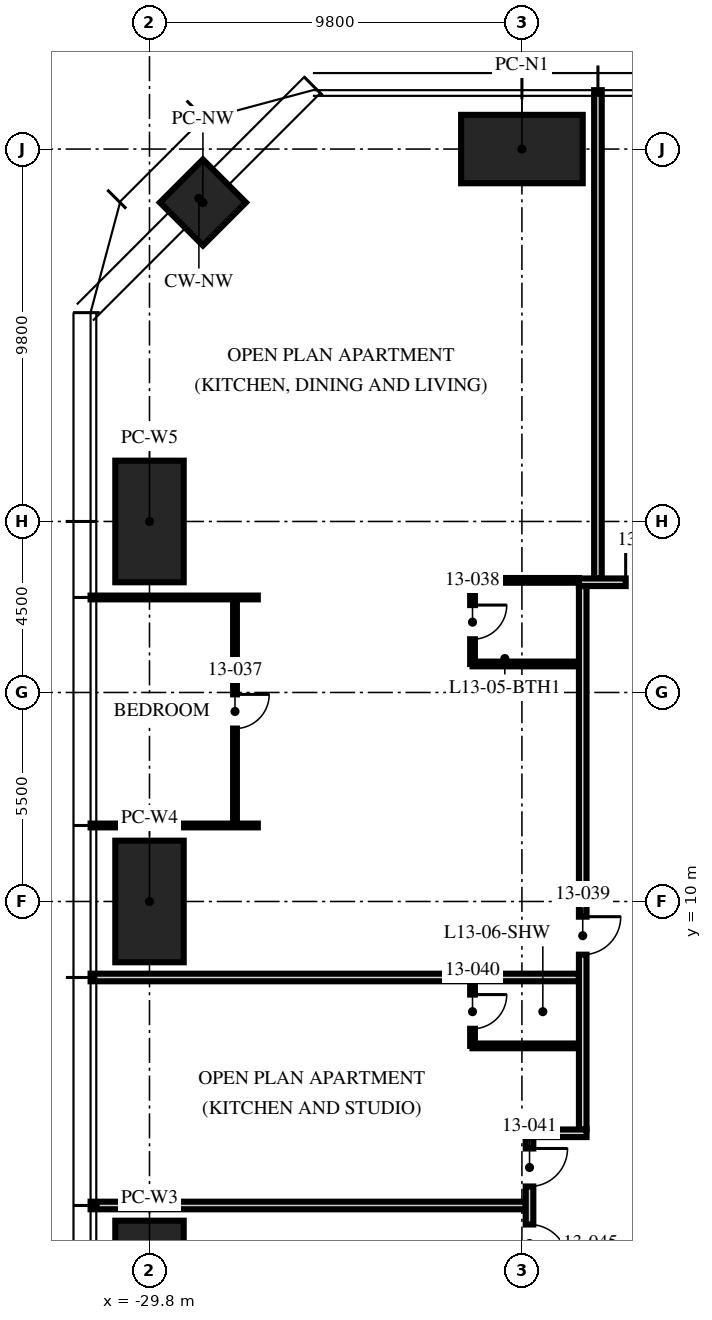
"""IFC4 building model, lengths in metres.
Left out: names, types, materials, properties, quantities, classifications, styles, units other than length and angle.
Written with IfcOpenShell. Run it as: python <this file> out.ifc"""

import sys

from ifc_helpers import new_model, si_unit, direction, frame, frame_2d, origin, origin_2d, place, context, subcontext, project, spatial, rectangle, hollow_rectangle, extrude, element, fill, save


model = new_model("IFC4")
c1 = context("Model", 3, precision=1e-05, world=origin(), true_north=direction((0.0, 1.0)))
c2 = subcontext(c1, "Body", "Model", "MODEL_VIEW")
j1 = project(units=[si_unit("LENGTHUNIT", "METRE"), si_unit("PLANEANGLEUNIT", "RADIAN")], contexts=[c1])
p1 = place(None, origin())
s1 = spatial("IfcSite", under=j1, at=p1, CompositionType="ELEMENT")
p2 = place(p1, origin())
s2 = spatial("IfcBuilding", under=s1, at=p2, CompositionType="ELEMENT")
p3 = place(p2, frame((0.0, 0.0, 54.75)))
s3 = spatial("IfcBuildingStorey", under=s2, at=p3, CompositionType="ELEMENT", Elevation=54.75)
for number, where, z_axis, x_axis in (
    (1, (-20.0, 29.8, 0.0), (0.0, 0.0, 1.0), (1.0, 0.0, 0.0)),
    (2, (-29.8, 0.0, 0.0), (0.0, 0.0, 1.0), (0.0, 1.0, 0.0)),
    (3, (-29.8, 10.0, 0.0), (0.0, 0.0, 1.0), (0.0, 1.0, 0.0)),
    (4, (-29.8, 20.0, 0.0), (0.0, 0.0, 1.0), (0.0, 1.0, 0.0)),
):
    element("IfcColumn", number, at=place(p3, frame(where, z_axis=z_axis, x_axis=x_axis)), inside=s3, PredefinedType="COLUMN", context=c2, shape_type="SweptSolid", body=[
        extrude(hollow_rectangle(XDim=3.2, YDim=1.8, WallThickness=0.2, at=origin_2d()), origin(), (0.0, 0.0, 1.0), 3.75),
    ])
p4 = place(p3, frame((-28.394, 28.394, 0.0), z_axis=(0.0, 0.0, 1.0), x_axis=(0.707106781187, 0.707106781187, 0.0)))
e5 = element("IfcColumn", 5, at=p4, inside=s3, PredefinedType="COLUMN", context=c2, shape_type="SweptSolid", body=[
    extrude(hollow_rectangle(XDim=1.6, YDim=1.6, WallThickness=0.1, at=origin_2d()), origin(), (0.0, 0.0, 1.0), 3.75),
])
p5 = place(p3, frame((-18.0, 18.5, 0.0), z_axis=(0.0, 0.0, 1.0), x_axis=(0.0, 1.0, 0.0)))
e6 = element("IfcWall", 6, at=p5, inside=s3, PredefinedType="PARTITIONING", context=c2, shape_type="SweptSolid", body=[
    extrude(rectangle(XDim=12.85, YDim=0.2, at=frame_2d((6.425, 0.0))), origin(), (0.0, 0.0, 1.0), 2.3),
])
for number, where, z_axis, x_axis in (
    (7, (-26.95, 18.0, 0.0), (0.0, 0.0, 1.0), (-1.0, 0.0, 0.0)),
    (8, (-26.95, 12.0, 0.0), (0.0, 0.0, 1.0), (-1.0, 0.0, 0.0)),
):
    element("IfcWall", number, at=place(p3, frame(where, z_axis=z_axis, x_axis=x_axis)), inside=s3, PredefinedType="PARTITIONING", context=c2, shape_type="SweptSolid", body=[
        extrude(rectangle(XDim=4.4, YDim=0.1, at=frame_2d((2.2, 0.0))), origin(), (0.0, 0.0, 1.0), 2.71),
    ])
p6 = place(p3, frame((-18.5, 8.0, 0.0), z_axis=(0.0, 0.0, 1.0), x_axis=(-1.0, 0.0, 0.0)))
e9 = element("IfcWall", 9, at=p6, inside=s3, PredefinedType="PARTITIONING", context=c2, shape_type="SweptSolid", body=[
    extrude(rectangle(XDim=12.85, YDim=0.2, at=frame_2d((6.425, 0.0))), origin(), (0.0, 0.0, 1.0), 2.71),
])
p7 = place(p3, frame((-19.9, 2.0, 0.0), z_axis=(0.0, 0.0, 1.0), x_axis=(-1.0, 0.0, 0.0)))
e10 = element("IfcWall", 10, at=p7, inside=s3, PredefinedType="PARTITIONING", context=c2, shape_type="SweptSolid", body=[
    extrude(rectangle(XDim=11.45, YDim=0.2, at=frame_2d((5.725, 0.0))), origin(), (0.0, 0.0, 1.0), 2.71),
])
p8 = place(p3, frame((-27.55, 18.0, 0.0), z_axis=(0.0, 0.0, 1.0), x_axis=(0.0, -1.0, 0.0)))
e11 = element("IfcWall", 11, at=p8, inside=s3, PredefinedType="PARTITIONING", context=c2, shape_type="SweptSolid", body=[
    extrude(rectangle(XDim=6.0, YDim=0.1, at=frame_2d((3.0, 0.0))), origin(), (0.0, 0.0, 1.0), 2.61),
])
p9 = place(p8, frame((2.55, 0.0, 0.0)))
e12 = element("IfcOpeningElement", 12, at=p9, cuts=e11, PredefinedType="OPENING", context=c2, shape_type="SweptSolid", body=[
    extrude(rectangle(XDim=0.9, YDim=2.1, at=frame_2d((0.45, 1.05))), frame((0.0, 0.06, 0.0), z_axis=(0.0, -1.0, 0.0), x_axis=(1.0, 0.0, 0.0)), (0.0, 0.0, 1.0), 0.12),
])
p10 = place(p3, frame((-21.3, 18.45, 0.0), z_axis=(0.0, 0.0, 1.0), x_axis=(0.0, -1.0, 0.0)))
e13 = element("IfcWall", 13, at=p10, inside=s3, PredefinedType="PARTITIONING", context=c2, shape_type="SweptSolid", body=[
    extrude(rectangle(XDim=2.2, YDim=0.125, at=frame_2d((1.1, 0.0))), origin(), (0.0, 0.0, 1.0), 3.5),
])
p11 = place(p10, frame((0.65, 0.0, 0.0)))
e14 = element("IfcOpeningElement", 14, at=p11, cuts=e13, PredefinedType="OPENING", context=c2, shape_type="SweptSolid", body=[
    extrude(rectangle(XDim=0.9, YDim=2.1, at=frame_2d((0.45, 1.05))), frame((0.0, 0.073, 0.0), z_axis=(0.0, -1.0, 0.0), x_axis=(1.0, 0.0, 0.0)), (0.0, 0.0, 1.0), 0.145),
])
p12 = place(p3, frame((-18.5, 18.45, 0.0), z_axis=(0.0, 0.0, 1.0), x_axis=(-1.0, 0.0, 0.0)))
e15 = element("IfcWall", 15, at=p12, inside=s3, PredefinedType="PARTITIONING", context=c2, shape_type="SweptSolid", body=[
    extrude(rectangle(XDim=2.8, YDim=0.125, at=frame_2d((1.4, 0.0))), origin(), (0.0, 0.0, 1.0), 2.3),
])
p13 = place(p3, frame((-18.5, 16.25, 0.0), z_axis=(0.0, 0.0, 1.0), x_axis=(-1.0, 0.0, 0.0)))
e16 = element("IfcWall", 16, at=p13, inside=s3, PredefinedType="PARTITIONING", context=c2, shape_type="SweptSolid", body=[
    extrude(rectangle(XDim=2.8, YDim=0.125, at=frame_2d((1.4, 0.0))), origin(), (0.0, 0.0, 1.0), 3.5),
])
p14 = place(p3, frame((-21.3, 8.0, 0.0), z_axis=(0.0, 0.0, 1.0), x_axis=(0.0, -1.0, 0.0)))
e17 = element("IfcWall", 17, at=p14, inside=s3, PredefinedType="PARTITIONING", context=c2, shape_type="SweptSolid", body=[
    extrude(rectangle(XDim=1.8, YDim=0.125, at=frame_2d((0.9, 0.0))), origin(), (0.0, 0.0, 1.0), 3.5),
])
p15 = place(p14, frame((0.45, 0.0, 0.0)))
e18 = element("IfcOpeningElement", 18, at=p15, cuts=e17, PredefinedType="OPENING", context=c2, shape_type="SweptSolid", body=[
    extrude(rectangle(XDim=0.9, YDim=2.1, at=frame_2d((0.45, 1.05))), frame((0.0, 0.073, 0.0), z_axis=(0.0, -1.0, 0.0), x_axis=(1.0, 0.0, 0.0)), (0.0, 0.0, 1.0), 0.145),
])
p16 = place(p3, frame((-18.5, 6.2, 0.0), z_axis=(0.0, 0.0, 1.0), x_axis=(-1.0, 0.0, 0.0)))
e19 = element("IfcWall", 19, at=p16, inside=s3, PredefinedType="PARTITIONING", context=c2, shape_type="SweptSolid", body=[
    extrude(rectangle(XDim=2.8, YDim=0.125, at=frame_2d((1.4, 0.0))), origin(), (0.0, 0.0, 1.0), 3.5),
])
p17 = place(p3, frame((-18.5, 18.4, 0.0), z_axis=(0.0, 0.0, 1.0), x_axis=(1.0, 0.0, 0.0)))
e20 = element("IfcWall", 20, at=p17, inside=s3, PredefinedType="PARTITIONING", context=c2, shape_type="SweptSolid", body=[
    extrude(rectangle(XDim=37.0, YDim=0.2, at=frame_2d((18.5, 0.0))), origin(), (0.0, 0.0, 1.0), 2.3),
])
p18 = place(p17, frame((1.23, 0.0, 0.0)))
e21 = element("IfcOpeningElement", 21, at=p18, cuts=e20, PredefinedType="OPENING", context=c2, shape_type="SweptSolid", body=[
    extrude(rectangle(XDim=1.0, YDim=2.2, at=frame_2d((0.5, 1.1))), frame((0.0, 0.11, 0.0), z_axis=(0.0, -1.0, 0.0), x_axis=(1.0, 0.0, 0.0)), (0.0, 0.0, 1.0), 0.22),
])
p19 = place(p3, frame((-18.4, 18.3, 0.0), z_axis=(0.0, 0.0, 1.0), x_axis=(0.0, -1.0, 0.0)))
e22 = element("IfcWall", 22, at=p19, inside=s3, PredefinedType="PARTITIONING", context=c2, shape_type="SweptSolid", body=[
    extrude(rectangle(XDim=14.3, YDim=0.2, at=frame_2d((7.15, 0.0))), origin(), (0.0, 0.0, 1.0), 2.3),
])
p20 = place(p19, frame((8.7, 0.0, 0.0)))
e23 = element("IfcOpeningElement", 23, at=p20, cuts=e22, PredefinedType="OPENING", context=c2, shape_type="SweptSolid", body=[
    extrude(rectangle(XDim=1.0, YDim=2.2, at=frame_2d((0.5, 1.1))), frame((0.0, 0.11, 0.0), z_axis=(0.0, -1.0, 0.0), x_axis=(1.0, 0.0, 0.0)), (0.0, 0.0, 1.0), 0.22),
])
p21 = place(p3, frame((-18.3, 3.9, 0.0), z_axis=(0.0, 0.0, 1.0), x_axis=(-1.0, 0.0, 0.0)))
e24 = element("IfcWall", 24, at=p21, inside=s3, PredefinedType="PARTITIONING", context=c2, shape_type="SweptSolid", body=[
    extrude(rectangle(XDim=1.6, YDim=0.2, at=frame_2d((0.8, 0.0))), origin(), (0.0, 0.0, 1.0), 3.5),
])
p22 = place(p3, frame((-19.8, 3.8, 0.0), z_axis=(0.0, 0.0, 1.0), x_axis=(0.0, -1.0, 0.0)))
e25 = element("IfcWall", 25, at=p22, inside=s3, PredefinedType="PARTITIONING", context=c2, shape_type="SweptSolid", body=[
    extrude(rectangle(XDim=3.6, YDim=0.2, at=frame_2d((1.8, 0.0))), origin(), (0.0, 0.0, 1.0), 3.5),
])
p23 = place(p22, frame((0.3, 0.0, 0.0)))
e26 = element("IfcOpeningElement", 26, at=p23, cuts=e25, PredefinedType="OPENING", context=c2, shape_type="SweptSolid", body=[
    extrude(rectangle(XDim=1.0, YDim=2.2, at=frame_2d((0.5, 1.1))), frame((0.0, 0.11, 0.0), z_axis=(0.0, -1.0, 0.0), x_axis=(1.0, 0.0, 0.0)), (0.0, 0.0, 1.0), 0.22),
])
p24 = place(p22, frame((2.3, 0.0, 0.0)))
e27 = element("IfcOpeningElement", 27, at=p24, cuts=e25, PredefinedType="OPENING", context=c2, shape_type="SweptSolid", body=[
    extrude(rectangle(XDim=1.0, YDim=2.2, at=frame_2d((0.5, 1.1))), frame((0.0, 0.11, 0.0), z_axis=(0.0, -1.0, 0.0), x_axis=(1.0, 0.0, 0.0)), (0.0, 0.0, 1.0), 0.22),
])
p25 = place(p18, origin())
e28 = element("IfcDoor", 28, at=p25, inside=s3, OperationType="SINGLE_SWING_LEFT", PredefinedType="DOOR", context=c2, shape_type="SweptSolid", body=[
    extrude(rectangle(XDim=1.0, YDim=2.2, at=frame_2d((0.5, 1.1))), frame((0.0, 0.025, 0.0), z_axis=(0.0, -1.0, 0.0), x_axis=(1.0, 0.0, 0.0)), (0.0, 0.0, 1.0), 0.05),
])
fill(e21, e28)
p26 = place(p9, origin())
e29 = element("IfcDoor", 29, at=p26, inside=s3, OperationType="SINGLE_SWING_LEFT", PredefinedType="DOOR", context=c2, shape_type="SweptSolid", body=[
    extrude(rectangle(XDim=0.9, YDim=2.1, at=frame_2d((0.45, 1.05))), frame((0.0, 0.025, 0.0), z_axis=(0.0, -1.0, 0.0), x_axis=(1.0, 0.0, 0.0)), (0.0, 0.0, 1.0), 0.05),
])
fill(e12, e29)
p27 = place(p11, origin())
e30 = element("IfcDoor", 30, at=p27, inside=s3, OperationType="SINGLE_SWING_LEFT", PredefinedType="DOOR", context=c2, shape_type="SweptSolid", body=[
    extrude(rectangle(XDim=0.9, YDim=2.1, at=frame_2d((0.45, 1.05))), frame((0.0, 0.025, 0.0), z_axis=(0.0, -1.0, 0.0), x_axis=(1.0, 0.0, 0.0)), (0.0, 0.0, 1.0), 0.05),
])
fill(e14, e30)
p28 = place(p20, origin())
e31 = element("IfcDoor", 31, at=p28, inside=s3, OperationType="SINGLE_SWING_LEFT", PredefinedType="DOOR", context=c2, shape_type="SweptSolid", body=[
    extrude(rectangle(XDim=1.0, YDim=2.2, at=frame_2d((0.5, 1.1))), frame((0.0, 0.025, 0.0), z_axis=(0.0, -1.0, 0.0), x_axis=(1.0, 0.0, 0.0)), (0.0, 0.0, 1.0), 0.05),
])
fill(e23, e31)
p29 = place(p15, origin())
e32 = element("IfcDoor", 32, at=p29, inside=s3, OperationType="SINGLE_SWING_LEFT", PredefinedType="DOOR", context=c2, shape_type="SweptSolid", body=[
    extrude(rectangle(XDim=0.9, YDim=2.1, at=frame_2d((0.45, 1.05))), frame((0.0, 0.025, 0.0), z_axis=(0.0, -1.0, 0.0), x_axis=(1.0, 0.0, 0.0)), (0.0, 0.0, 1.0), 0.05),
])
fill(e18, e32)
p30 = place(p23, origin())
e33 = element("IfcDoor", 33, at=p30, inside=s3, OperationType="SINGLE_SWING_LEFT", PredefinedType="DOOR", context=c2, shape_type="SweptSolid", body=[
    extrude(rectangle(XDim=1.0, YDim=2.2, at=frame_2d((0.5, 1.1))), frame((0.0, 0.025, 0.0), z_axis=(0.0, -1.0, 0.0), x_axis=(1.0, 0.0, 0.0)), (0.0, 0.0, 1.0), 0.05),
])
fill(e26, e33)
p31 = place(p24, origin())
e34 = element("IfcDoor", 34, at=p31, inside=s3, OperationType="SINGLE_SWING_RIGHT", PredefinedType="DOOR", context=c2, shape_type="SweptSolid", body=[
    extrude(rectangle(XDim=1.0, YDim=2.2, at=frame_2d((0.5, 1.1))), frame((0.0, 0.025, 0.0), z_axis=(0.0, -1.0, 0.0), x_axis=(1.0, 0.0, 0.0)), (0.0, 0.0, 1.0), 0.05),
])
fill(e27, e34)
save(model, sys.argv[1])
